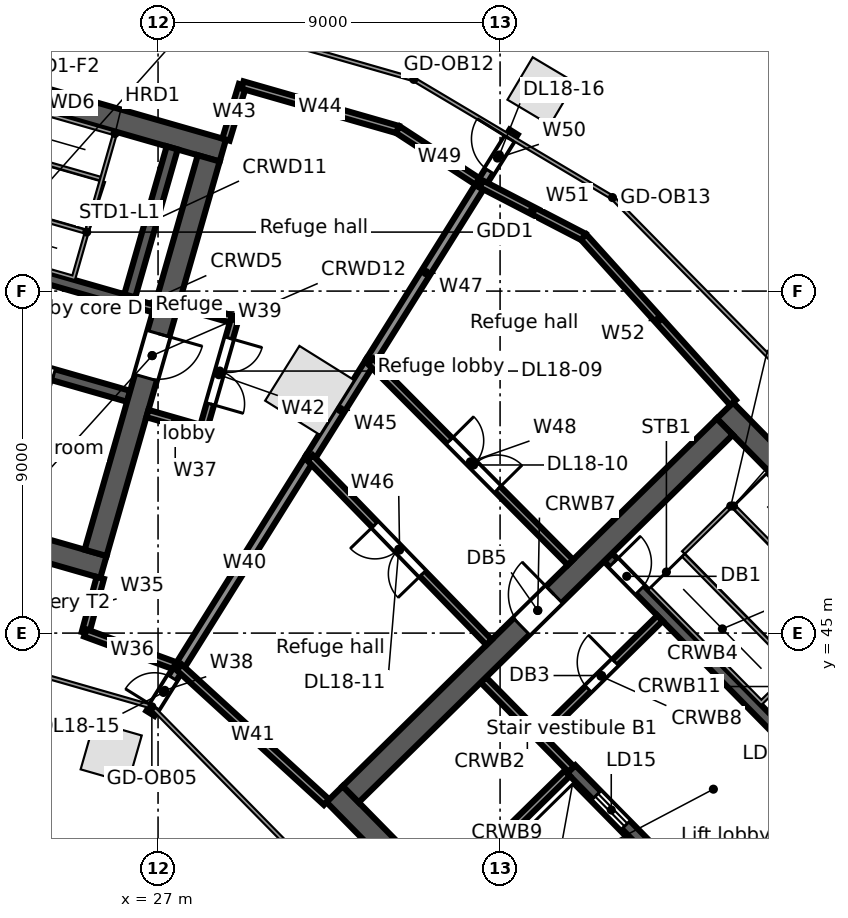
"""IFC4 building model, lengths in metres.
Left out: names, types, materials, properties, quantities, classifications, styles, units other than length and angle.
Written with IfcOpenShell. Run it as: python <this file> out.ifc"""

import sys

from ifc_helpers import new_model, si_unit, direction, frame, frame_2d, origin, origin_2d, place, context, subcontext, project, spatial, rectangle, extrude, element, fill, save


model = new_model("IFC4")
c1 = context("Model", 3, precision=1e-05, world=origin(), true_north=direction((0.0, 1.0)))
c2 = subcontext(c1, "Body", "Model", "MODEL_VIEW")
j1 = project(units=[si_unit("LENGTHUNIT", "METRE"), si_unit("PLANEANGLEUNIT", "RADIAN")], contexts=[c1])
p1 = place(None, origin())
s1 = spatial("IfcSite", under=j1, at=p1, CompositionType="ELEMENT")
p2 = place(p1, origin())
s2 = spatial("IfcBuilding", under=s1, at=p2, CompositionType="ELEMENT")
p3 = place(p2, frame((0.0, 0.0, 91.5)))
s3 = spatial("IfcBuildingStorey", under=s2, at=p3, CompositionType="ELEMENT", Elevation=91.5)
for number, where, z_axis, x_axis in (
    (1, (37.085, 59.262, 0.0), (0.0, 0.0, 1.0), (-0.859, 0.511, 0.0)),
    (2, (25.767, 41.86, 0.0), (0.0, 0.0, 1.0), (0.961, -0.276, 0.0)),
):
    element("IfcColumn", number, at=place(p3, frame(where, z_axis=z_axis, x_axis=x_axis)), inside=s3, PredefinedType="COLUMN", context=c2, shape_type="SweptSolid", body=[
        extrude(rectangle(XDim=1.3, YDim=1.3, at=origin_2d()), origin(), (0.0, 0.0, 1.0), 5.6),
    ])
p4 = place(p3, frame((30.99, 51.386, 0.0), z_axis=(0.0, 0.0, 1.0), x_axis=(0.529919264233, 0.848048096156, 0.0)))
e3 = element("IfcColumn", 3, at=p4, inside=s3, PredefinedType="COLUMN", context=c2, shape_type="SweptSolid", body=[
    extrude(rectangle(XDim=1.7, YDim=1.7, at=origin_2d()), origin(), (0.0, 0.0, 1.0), 5.6),
])
p5 = place(p3, frame((31.646, 40.763, 0.0), z_axis=(0.0, 0.0, 1.0), x_axis=(0.700911255944, -0.713248491965, 0.0)))
e4 = element("IfcWall", 4, at=p5, inside=s3, PredefinedType="SOLIDWALL", context=c2, shape_type="SweptSolid", body=[
    extrude(rectangle(XDim=15.0, YDim=0.6, at=frame_2d((7.5, 0.0))), origin(), (0.0, 0.0, 1.0), 5.28),
])
p6 = place(p5, frame((12.9, 0.0, 0.0)))
e5 = element("IfcOpeningElement", 5, at=p6, cuts=e4, PredefinedType="OPENING", context=c2, shape_type="SweptSolid", body=[
    extrude(rectangle(XDim=1.2, YDim=2.1, at=frame_2d((0.6, 1.05))), frame((0.0, 0.31, 0.0), z_axis=(0.0, -1.0, 0.0), x_axis=(1.0, 0.0, 0.0)), (0.0, 0.0, 1.0), 0.62),
])
p7 = place(p3, frame((35.561, 43.769, 0.0), z_axis=(0.0, 0.0, 1.0), x_axis=(0.70090232736, -0.713257266, 0.0)))
e6 = element("IfcWall", 6, at=p7, inside=s3, PredefinedType="SOLIDWALL", context=c2, shape_type="SweptSolid", body=[
    extrude(rectangle(XDim=3.3, YDim=0.2, at=frame_2d((1.65, 0.0))), origin(), (0.0, 0.0, 1.0), 5.28),
])
p8 = place(p3, frame((37.874, 41.416, 0.0), z_axis=(0.0, 0.0, 1.0), x_axis=(0.700918271237, -0.71324159795, 0.0)))
e7 = element("IfcWall", 7, at=p8, inside=s3, PredefinedType="SOLIDWALL", context=c2, shape_type="SweptSolid", body=[
    extrude(rectangle(XDim=8.4, YDim=0.3, at=frame_2d((4.2, 0.0))), origin(), (0.0, 0.0, 1.0), 5.28),
])
p9 = place(p8, frame((0.95, 0.0, 0.0)))
e8 = element("IfcOpeningElement", 8, at=p9, cuts=e7, PredefinedType="OPENING", context=c2, shape_type="SweptSolid", body=[
    extrude(rectangle(XDim=1.1, YDim=2.1, at=frame_2d((0.55, 1.05))), frame((0.0, 0.16, 0.0), z_axis=(0.0, -1.0, 0.0), x_axis=(1.0, 0.0, 0.0)), (0.0, 0.0, 1.0), 0.32),
])
p10 = place(p8, frame((3.95, 0.0, 0.0)))
e9 = element("IfcOpeningElement", 9, at=p10, cuts=e7, PredefinedType="OPENING", context=c2, shape_type="SweptSolid", body=[
    extrude(rectangle(XDim=1.1, YDim=2.1, at=frame_2d((0.55, 1.05))), frame((0.0, 0.16, 0.0), z_axis=(0.0, -1.0, 0.0), x_axis=(1.0, 0.0, 0.0)), (0.0, 0.0, 1.0), 0.32),
])
p11 = place(p8, frame((6.65, 0.0, 0.0)))
e10 = element("IfcOpeningElement", 10, at=p11, cuts=e7, PredefinedType="OPENING", context=c2, shape_type="SweptSolid", body=[
    extrude(rectangle(XDim=1.1, YDim=2.1, at=frame_2d((0.55, 1.05))), frame((0.0, 0.16, 0.0), z_axis=(0.0, -1.0, 0.0), x_axis=(1.0, 0.0, 0.0)), (0.0, 0.0, 1.0), 0.32),
])
p12 = place(p3, frame((38.842, 46.993, 0.0), z_axis=(0.0, 0.0, 1.0), x_axis=(0.700907701701, -0.713251984713, 0.0)))
e11 = element("IfcWall", 11, at=p12, inside=s3, PredefinedType="SOLIDWALL", context=c2, shape_type="SweptSolid", body=[
    extrude(rectangle(XDim=7.1, YDim=0.3, at=frame_2d((3.55, 0.0))), origin(), (0.0, 0.0, 1.0), 5.28),
])
p13 = place(p12, frame((0.2, 0.0, 0.0)))
e12 = element("IfcOpeningElement", 12, at=p13, cuts=e11, PredefinedType="OPENING", context=c2, shape_type="SweptSolid", body=[
    extrude(rectangle(XDim=1.0, YDim=2.1, at=frame_2d((0.5, 1.05))), frame((0.0, 0.16, 0.0), z_axis=(0.0, -1.0, 0.0), x_axis=(1.0, 0.0, 0.0)), (0.0, 0.0, 1.0), 0.32),
])
p14 = place(p3, frame((41.917, 50.856, 0.0), z_axis=(0.0, 0.0, 1.0), x_axis=(0.700911255944, -0.713248491965, 0.0)))
e13 = element("IfcWall", 13, at=p14, inside=s3, PredefinedType="SOLIDWALL", context=c2, shape_type="SweptSolid", body=[
    extrude(rectangle(XDim=15.0, YDim=0.6, at=frame_2d((7.5, 0.0))), origin(), (0.0, 0.0, 1.0), 5.28),
])
p15 = place(p3, frame((32.07, 40.759, 0.0), z_axis=(0.0, 0.0, 1.0), x_axis=(0.713245344712, 0.70091445858, 0.0)))
e14 = element("IfcWall", 14, at=p15, inside=s3, PredefinedType="SOLIDWALL", context=c2, shape_type="SweptSolid", body=[
    extrude(rectangle(XDim=13.8, YDim=0.6, at=frame_2d((6.9, 0.0))), origin(), (0.0, 0.0, 1.0), 5.28),
])
p16 = place(p15, frame((6.3, 0.0, 0.0)))
e15 = element("IfcOpeningElement", 15, at=p16, cuts=e14, PredefinedType="OPENING", context=c2, shape_type="SweptSolid", body=[
    extrude(rectangle(XDim=1.2, YDim=2.1, at=frame_2d((0.6, 1.05))), frame((0.0, 0.31, 0.0), z_axis=(0.0, -1.0, 0.0), x_axis=(1.0, 0.0, 0.0)), (0.0, 0.0, 1.0), 0.62),
])
p17 = place(p3, frame((37.104, 42.342, 0.0), z_axis=(0.0, 0.0, 1.0), x_axis=(0.713281298468, 0.700877870428, 0.0)))
e16 = element("IfcWall", 16, at=p17, inside=s3, PredefinedType="PARTITIONING", context=c2, shape_type="SweptSolid", body=[
    extrude(rectangle(XDim=4.35, YDim=0.2, at=frame_2d((2.175, 0.0))), origin(), (0.0, 0.0, 1.0), 5.28),
])
p18 = place(p17, frame((1.7, 0.0, 0.0)))
e17 = element("IfcOpeningElement", 17, at=p18, cuts=e16, PredefinedType="OPENING", context=c2, shape_type="SweptSolid", body=[
    extrude(rectangle(XDim=1.0, YDim=2.1, at=frame_2d((0.5, 1.05))), frame((0.0, 0.11, 0.0), z_axis=(0.0, -1.0, 0.0), x_axis=(1.0, 0.0, 0.0)), (0.0, 0.0, 1.0), 0.22),
])
p19 = place(p3, frame((34.593, 38.191, 0.0), z_axis=(0.0, 0.0, 1.0), x_axis=(0.713252216116, 0.700907466222, 0.0)))
e18 = element("IfcWall", 18, at=p19, inside=s3, PredefinedType="SOLIDWALL", context=c2, shape_type="SweptSolid", body=[
    extrude(rectangle(XDim=4.45, YDim=0.2, at=frame_2d((2.225, 0.0))), origin(), (0.0, 0.0, 1.0), 5.28),
])
p20 = place(p3, frame((42.163, 30.488, 0.0), z_axis=(0.0, 0.0, 1.0), x_axis=(0.713245344712, 0.70091445858, 0.0)))
e19 = element("IfcWall", 19, at=p20, inside=s3, PredefinedType="SOLIDWALL", context=c2, shape_type="SweptSolid", body=[
    extrude(rectangle(XDim=13.8, YDim=0.6, at=frame_2d((6.9, 0.0))), origin(), (0.0, 0.0, 1.0), 5.28),
])
p21 = place(p3, frame((16.911, 49.221, 0.0), z_axis=(0.0, 0.0, 1.0), x_axis=(0.96126248289, -0.275634611374, 0.0)))
e20 = element("IfcWall", 20, at=p21, inside=s3, PredefinedType="SOLIDWALL", context=c2, shape_type="SweptSolid", body=[
    extrude(rectangle(XDim=9.0, YDim=0.6, at=frame_2d((4.5, 0.0))), origin(), (0.0, 0.0, 1.0), 5.28),
])
p22 = place(p3, frame((21.131, 52.692, 0.0), z_axis=(0.0, 0.0, 1.0), x_axis=(0.961271492568, -0.275603188616, 0.0)))
e21 = element("IfcWall", 21, at=p22, inside=s3, PredefinedType="SOLIDWALL", context=c2, shape_type="SweptSolid", body=[
    extrude(rectangle(XDim=5.3, YDim=0.3, at=frame_2d((2.65, 0.0))), origin(), (0.0, 0.0, 1.0), 5.28),
])
p23 = place(p22, frame((2.35, 0.0, 0.0)))
e22 = element("IfcOpeningElement", 22, at=p23, cuts=e21, PredefinedType="OPENING", context=c2, shape_type="SweptSolid", body=[
    extrude(rectangle(XDim=0.9, YDim=2.1, at=frame_2d((0.45, 1.05))), frame((0.0, 0.16, 0.0), z_axis=(0.0, -1.0, 0.0), x_axis=(1.0, 0.0, 0.0)), (0.0, 0.0, 1.0), 0.32),
])
p24 = place(p3, frame((19.389, 55.689, 0.0), z_axis=(0.0, 0.0, 1.0), x_axis=(0.961261397636, -0.275638396117, 0.0)))
e23 = element("IfcWall", 23, at=p24, inside=s3, PredefinedType="SOLIDWALL", context=c2, shape_type="SweptSolid", body=[
    extrude(rectangle(XDim=7.1, YDim=0.3, at=frame_2d((3.55, 0.0))), origin(), (0.0, 0.0, 1.0), 5.28),
])
p25 = place(p24, frame((0.2, 0.0, 0.0)))
e24 = element("IfcOpeningElement", 24, at=p25, cuts=e23, PredefinedType="OPENING", context=c2, shape_type="SweptSolid", body=[
    extrude(rectangle(XDim=1.0, YDim=2.1, at=frame_2d((0.5, 1.05))), frame((0.0, 0.16, 0.0), z_axis=(0.0, -1.0, 0.0), x_axis=(1.0, 0.0, 0.0)), (0.0, 0.0, 1.0), 0.32),
])
p26 = place(p3, frame((26.214, 53.732, 0.0), z_axis=(0.0, 0.0, 1.0), x_axis=(0.96122076476, -0.27578005982, 0.0)))
e25 = element("IfcWall", 25, at=p26, inside=s3, PredefinedType="SOLIDWALL", context=c2, shape_type="SweptSolid", body=[
    extrude(rectangle(XDim=0.7, YDim=0.2, at=frame_2d((0.35, 0.0))), origin(), (0.0, 0.0, 1.0), 5.28),
])
p27 = place(p3, frame((20.053, 60.18, 0.0), z_axis=(0.0, 0.0, 1.0), x_axis=(0.96126248289, -0.275634611374, 0.0)))
e26 = element("IfcWall", 26, at=p27, inside=s3, PredefinedType="SOLIDWALL", context=c2, shape_type="SweptSolid", body=[
    extrude(rectangle(XDim=9.0, YDim=0.6, at=frame_2d((4.5, 0.0))), origin(), (0.0, 0.0, 1.0), 5.28),
])
p28 = place(p3, frame((26.256, 53.876, 0.0), z_axis=(0.0, 0.0, 1.0), x_axis=(0.275612739511, 0.961268754209, 0.0)))
e27 = element("IfcWall", 27, at=p28, inside=s3, PredefinedType="SOLIDWALL", context=c2, shape_type="SweptSolid", body=[
    extrude(rectangle(XDim=4.05, YDim=0.3, at=frame_2d((2.025, 0.0))), origin(), (0.0, 0.0, 1.0), 5.28),
])
p29 = place(p3, frame((25.356, 47.112, 0.0), z_axis=(0.0, 0.0, 1.0), x_axis=(0.275631631629, 0.961263337304, 0.0)))
e28 = element("IfcWall", 28, at=p29, inside=s3, PredefinedType="SOLIDWALL", context=c2, shape_type="SweptSolid", body=[
    extrude(rectangle(XDim=10.8, YDim=0.6, at=frame_2d((5.4, 0.0))), origin(), (0.0, 0.0, 1.0), 5.28),
])
p30 = place(p29, frame((4.8, 0.0, 0.0)))
e29 = element("IfcOpeningElement", 29, at=p30, cuts=e28, PredefinedType="OPENING", context=c2, shape_type="SweptSolid", body=[
    extrude(rectangle(XDim=1.2, YDim=2.1, at=frame_2d((0.6, 1.05))), frame((0.0, 0.31, 0.0), z_axis=(0.0, -1.0, 0.0), x_axis=(1.0, 0.0, 0.0)), (0.0, 0.0, 1.0), 0.62),
])
p31 = place(p3, frame((25.088, 45.004, 0.0), z_axis=(0.0, 0.0, 1.0), x_axis=(0.260761429939, 0.965403271517, 0.0)))
e30 = element("IfcWall", 30, at=p31, inside=s3, PredefinedType="PARTITIONING", context=c2, shape_type="SweptSolid", body=[
    extrude(rectangle(XDim=1.5, YDim=0.2, at=frame_2d((0.75, 0.0))), origin(), (0.0, 0.0, 1.0), 5.28),
])
p32 = place(p3, frame((25.088, 45.004, 0.0), z_axis=(0.0, 0.0, 1.0), x_axis=(0.93889532653, -0.344202797519, 0.0)))
e31 = element("IfcWall", 31, at=p32, inside=s3, PredefinedType="PARTITIONING", context=c2, shape_type="SweptSolid", body=[
    extrude(rectangle(XDim=2.629, YDim=0.2, at=frame_2d((1.314, 0.0))), origin(), (0.0, 0.0, 1.0), 4.452),
])
p33 = place(p3, frame((26.72, 50.778, 0.0), z_axis=(0.0, 0.0, 1.0), x_axis=(0.961202731862, -0.275842905041, 0.0)))
e32 = element("IfcWall", 32, at=p33, inside=s3, PredefinedType="PARTITIONING", context=c2, shape_type="SweptSolid", body=[
    extrude(rectangle(XDim=1.523, YDim=0.2, at=frame_2d((0.762, 0.0))), origin(), (0.0, 0.0, 1.0), 5.28),
])
p34 = place(p3, frame((26.799, 42.887, 0.0), z_axis=(0.0, 0.0, 1.0), x_axis=(0.529614967624, 0.848238165888, 0.0)))
e33 = element("IfcWall", 33, at=p34, inside=s3, PredefinedType="PARTITIONING", context=c2, shape_type="SweptSolid", body=[
    extrude(rectangle(XDim=1.429, YDim=0.25, at=frame_2d((0.714, 0.0))), origin(), (0.0, 0.0, 1.0), 5.28),
])
p35 = place(p34, frame((0.2, 0.0, 0.0)))
e34 = element("IfcOpeningElement", 34, at=p35, cuts=e33, PredefinedType="OPENING", context=c2, shape_type="SweptSolid", body=[
    extrude(rectangle(XDim=0.9, YDim=2.1, at=frame_2d((0.45, 1.05))), frame((0.0, 0.135, 0.0), z_axis=(0.0, -1.0, 0.0), x_axis=(1.0, 0.0, 0.0)), (0.0, 0.0, 1.0), 0.27),
])
p36 = place(p3, frame((27.547, 53.662, 0.0), z_axis=(0.0, 0.0, 1.0), x_axis=(0.961190533403, -0.27588540827, 0.0)))
e35 = element("IfcWall", 35, at=p36, inside=s3, PredefinedType="PARTITIONING", context=c2, shape_type="SweptSolid", body=[
    extrude(rectangle(XDim=1.523, YDim=0.2, at=frame_2d((0.761, 0.0))), origin(), (0.0, 0.0, 1.0), 5.28),
])
p37 = place(p3, frame((27.556, 44.099, 0.0), z_axis=(0.0, 0.0, 1.0), x_axis=(0.529901019477, 0.848059496472, 0.0)))
e36 = element("IfcWall", 36, at=p37, inside=s3, PredefinedType="PARTITIONING", context=c2, shape_type="SweptSolid", body=[
    extrude(rectangle(XDim=6.5, YDim=0.25, at=frame_2d((3.25, 0.0))), origin(), (0.0, 0.0, 1.0), 5.28),
])
p38 = place(p3, frame((27.556, 44.099, 0.0), z_axis=(0.0, 0.0, 1.0), x_axis=(0.737709390417, -0.675118400942, 0.0)))
e37 = element("IfcWall", 37, at=p38, inside=s3, PredefinedType="PARTITIONING", context=c2, shape_type="SweptSolid", body=[
    extrude(rectangle(XDim=5.254, YDim=0.2, at=frame_2d((2.627, 0.0))), origin(), (0.0, 0.0, 1.0), 5.28),
])
p39 = place(p3, frame((28.184, 50.358, 0.0), z_axis=(0.0, 0.0, 1.0), x_axis=(0.27561305073, 0.961268664977, 0.0)))
e38 = element("IfcWall", 38, at=p39, inside=s3, PredefinedType="PARTITIONING", context=c2, shape_type="SweptSolid", body=[
    extrude(rectangle(XDim=3.0, YDim=0.2, at=frame_2d((1.5, 0.0))), origin(), (0.0, 0.0, 1.0), 4.86),
])
p40 = place(p39, frame((0.7, 0.0, 0.0)))
e39 = element("IfcOpeningElement", 39, at=p40, cuts=e38, PredefinedType="OPENING", context=c2, shape_type="SweptSolid", body=[
    extrude(rectangle(XDim=1.8, YDim=2.1, at=frame_2d((0.9, 1.05))), frame((0.0, 0.11, 0.0), z_axis=(0.0, -1.0, 0.0), x_axis=(1.0, 0.0, 0.0)), (0.0, 0.0, 1.0), 0.22),
])
p41 = place(p3, frame((28.787, 57.987, 0.0), z_axis=(0.0, 0.0, 1.0), x_axis=(0.290391164202, 0.9569080268, 0.0)))
e40 = element("IfcWall", 40, at=p41, inside=s3, PredefinedType="PARTITIONING", context=c2, shape_type="SweptSolid", body=[
    extrude(rectangle(XDim=1.501, YDim=0.2, at=frame_2d((0.75, 0.0))), origin(), (0.0, 0.0, 1.0), 5.28),
])
p42 = place(p3, frame((29.223, 59.423, 0.0), z_axis=(0.0, 0.0, 1.0), x_axis=(0.961217704803, -0.27579072496, 0.0)))
e41 = element("IfcWall", 41, at=p42, inside=s3, PredefinedType="PARTITIONING", context=c2, shape_type="SweptSolid", body=[
    extrude(rectangle(XDim=4.25, YDim=0.2, at=frame_2d((2.125, 0.0))), origin(), (0.0, 0.0, 1.0), 5.28),
])
p43 = place(p3, frame((31.0, 49.611, 0.0), z_axis=(0.0, 0.0, 1.0), x_axis=(0.530028199927, 0.847980015851, 0.0)))
e42 = element("IfcWall", 42, at=p43, inside=s3, PredefinedType="PARTITIONING", context=c2, shape_type="SweptSolid", body=[
    extrude(rectangle(XDim=3.0, YDim=0.25, at=frame_2d((1.5, 0.0))), origin(), (0.0, 0.0, 1.0), 4.342),
])
p44 = place(p3, frame((31.0, 49.611, 0.0), z_axis=(0.0, 0.0, 1.0), x_axis=(0.696524576566, -0.717532935996, 0.0)))
e43 = element("IfcWall", 43, at=p44, inside=s3, PredefinedType="PARTITIONING", context=c2, shape_type="SweptSolid", body=[
    extrude(rectangle(XDim=6.763, YDim=0.2, at=frame_2d((3.382, 0.0))), origin(), (0.0, 0.0, 1.0), 5.28),
])
p45 = place(p44, frame((2.45, 0.0, 0.0)))
e44 = element("IfcOpeningElement", 44, at=p45, cuts=e43, PredefinedType="OPENING", context=c2, shape_type="SweptSolid", body=[
    extrude(rectangle(XDim=1.8, YDim=2.1, at=frame_2d((0.9, 1.05))), frame((0.0, 0.11, 0.0), z_axis=(0.0, -1.0, 0.0), x_axis=(1.0, 0.0, 0.0)), (0.0, 0.0, 1.0), 0.22),
])
p46 = place(p3, frame((32.59, 52.155, 0.0), z_axis=(0.0, 0.0, 1.0), x_axis=(0.529967019041, 0.848018253771, 0.0)))
e45 = element("IfcWall", 45, at=p46, inside=s3, PredefinedType="PARTITIONING", context=c2, shape_type="SweptSolid", body=[
    extrude(rectangle(XDim=5.5, YDim=0.25, at=frame_2d((2.75, 0.0))), origin(), (0.0, 0.0, 1.0), 4.342),
])
p47 = place(p3, frame((32.59, 52.155, 0.0), z_axis=(0.0, 0.0, 1.0), x_axis=(0.704895322568, -0.709311345054, 0.0)))
e46 = element("IfcWall", 46, at=p47, inside=s3, PredefinedType="PARTITIONING", context=c2, shape_type="SweptSolid", body=[
    extrude(rectangle(XDim=7.463, YDim=0.2, at=frame_2d((3.732, 0.0))), origin(), (0.0, 0.0, 1.0), 4.342),
])
p48 = place(p47, frame((2.95, 0.0, 0.0)))
e47 = element("IfcOpeningElement", 47, at=p48, cuts=e46, PredefinedType="OPENING", context=c2, shape_type="SweptSolid", body=[
    extrude(rectangle(XDim=1.8, YDim=2.1, at=frame_2d((0.9, 1.05))), frame((0.0, 0.11, 0.0), z_axis=(0.0, -1.0, 0.0), x_axis=(1.0, 0.0, 0.0)), (0.0, 0.0, 1.0), 0.22),
])
p49 = place(p3, frame((33.308, 58.251, 0.0), z_axis=(0.0, 0.0, 1.0), x_axis=(0.837749484824, -0.546054759779, 0.0)))
e48 = element("IfcWall", 48, at=p49, inside=s3, PredefinedType="PARTITIONING", context=c2, shape_type="SweptSolid", body=[
    extrude(rectangle(XDim=2.622, YDim=0.2, at=frame_2d((1.311, 0.0))), origin(), (0.0, 0.0, 1.0), 5.28),
])
p50 = place(p3, frame((35.505, 56.819, 0.0), z_axis=(0.0, 0.0, 1.0), x_axis=(0.529794245677, 0.848126203609, 0.0)))
e49 = element("IfcWall", 49, at=p50, inside=s3, PredefinedType="PARTITIONING", context=c2, shape_type="SweptSolid", body=[
    extrude(rectangle(XDim=1.608, YDim=0.25, at=frame_2d((0.804, 0.0))), origin(), (0.0, 0.0, 1.0), 4.342),
])
p51 = place(p50, frame((0.4, 0.0, 0.0)))
e50 = element("IfcOpeningElement", 50, at=p51, cuts=e49, PredefinedType="OPENING", context=c2, shape_type="SweptSolid", body=[
    extrude(rectangle(XDim=1.0, YDim=2.1, at=frame_2d((0.5, 1.05))), frame((0.0, 0.135, 0.0), z_axis=(0.0, -1.0, 0.0), x_axis=(1.0, 0.0, 0.0)), (0.0, 0.0, 1.0), 0.27),
])
p52 = place(p3, frame((35.505, 56.819, 0.0), z_axis=(0.0, 0.0, 1.0), x_axis=(0.887881146957, -0.460072895179, 0.0)))
e51 = element("IfcWall", 51, at=p52, inside=s3, PredefinedType="PARTITIONING", context=c2, shape_type="SweptSolid", body=[
    extrude(rectangle(XDim=3.034, YDim=0.2, at=frame_2d((1.517, 0.0))), origin(), (0.0, 0.0, 1.0), 4.342),
])
p53 = place(p3, frame((38.199, 55.423, 0.0), z_axis=(0.0, 0.0, 1.0), x_axis=(0.669853780439, -0.742493038911, 0.0)))
e52 = element("IfcWall", 52, at=p53, inside=s3, PredefinedType="PARTITIONING", context=c2, shape_type="SweptSolid", body=[
    extrude(rectangle(XDim=5.868, YDim=0.2, at=frame_2d((2.934, 0.0))), origin(), (0.0, 0.0, 1.0), 5.28),
])
p54 = place(p9, origin())
e53 = element("IfcDoor", 53, at=p54, inside=s3, OperationType="DOUBLE_DOOR_SLIDING", PredefinedType="DOOR", context=c2, shape_type="SweptSolid", body=[
    extrude(rectangle(XDim=1.1, YDim=2.1, at=frame_2d((0.55, 1.05))), frame((0.0, 0.025, 0.0), z_axis=(0.0, -1.0, 0.0), x_axis=(1.0, 0.0, 0.0)), (0.0, 0.0, 1.0), 0.05),
])
fill(e8, e53)
p55 = place(p13, origin())
e54 = element("IfcDoor", 54, at=p55, inside=s3, OperationType="SINGLE_SWING_LEFT", PredefinedType="DOOR", context=c2, shape_type="SweptSolid", body=[
    extrude(rectangle(XDim=1.0, YDim=2.1, at=frame_2d((0.5, 1.05))), frame((0.0, 0.025, 0.0), z_axis=(0.0, -1.0, 0.0), x_axis=(1.0, 0.0, 0.0)), (0.0, 0.0, 1.0), 0.05),
])
fill(e12, e54)
p56 = place(p18, origin())
e55 = element("IfcDoor", 55, at=p56, inside=s3, OperationType="SINGLE_SWING_RIGHT", PredefinedType="DOOR", context=c2, shape_type="SweptSolid", body=[
    extrude(rectangle(XDim=1.0, YDim=2.1, at=frame_2d((0.5, 1.05))), frame((0.0, 0.025, 0.0), z_axis=(0.0, -1.0, 0.0), x_axis=(1.0, 0.0, 0.0)), (0.0, 0.0, 1.0), 0.05),
])
fill(e17, e55)
p57 = place(p16, origin())
e56 = element("IfcDoor", 56, at=p57, inside=s3, OperationType="SINGLE_SWING_RIGHT", PredefinedType="DOOR", context=c2, shape_type="SweptSolid", body=[
    extrude(rectangle(XDim=1.2, YDim=2.1, at=frame_2d((0.6, 1.05))), frame((0.0, 0.025, 0.0), z_axis=(0.0, -1.0, 0.0), x_axis=(1.0, 0.0, 0.0)), (0.0, 0.0, 1.0), 0.05),
])
fill(e15, e56)
p58 = place(p30, frame((1.2, 0.0, 0.0), z_axis=(0.0, 0.0, 1.0), x_axis=(-1.0, 0.0, 0.0)))
e57 = element("IfcDoor", 57, at=p58, inside=s3, OperationType="SINGLE_SWING_LEFT", PredefinedType="DOOR", context=c2, shape_type="SweptSolid", body=[
    extrude(rectangle(XDim=1.2, YDim=2.1, at=frame_2d((0.6, 1.05))), frame((0.0, 0.025, 0.0), z_axis=(0.0, -1.0, 0.0), x_axis=(1.0, 0.0, 0.0)), (0.0, 0.0, 1.0), 0.05),
])
fill(e29, e57)
p59 = place(p23, frame((0.9, 0.0, 0.0), z_axis=(0.0, 0.0, 1.0), x_axis=(-1.0, 0.0, 0.0)))
e58 = element("IfcDoor", 58, at=p59, inside=s3, OperationType="SINGLE_SWING_LEFT", PredefinedType="DOOR", context=c2, shape_type="SweptSolid", body=[
    extrude(rectangle(XDim=0.9, YDim=2.1, at=frame_2d((0.45, 1.05))), frame((0.0, 0.025, 0.0), z_axis=(0.0, -1.0, 0.0), x_axis=(1.0, 0.0, 0.0)), (0.0, 0.0, 1.0), 0.05),
])
fill(e22, e58)
p60 = place(p40, frame((1.8, 0.0, 0.0), z_axis=(0.0, 0.0, 1.0), x_axis=(-1.0, 0.0, 0.0)))
e59 = element("IfcDoor", 59, at=p60, inside=s3, OperationType="DOUBLE_DOOR_SINGLE_SWING", PredefinedType="DOOR", context=c2, shape_type="SweptSolid", body=[
    extrude(rectangle(XDim=1.8, YDim=2.1, at=frame_2d((0.9, 1.05))), frame((0.0, 0.025, 0.0), z_axis=(0.0, -1.0, 0.0), x_axis=(1.0, 0.0, 0.0)), (0.0, 0.0, 1.0), 0.05),
])
fill(e39, e59)
p61 = place(p48, origin())
e60 = element("IfcDoor", 60, at=p61, inside=s3, OperationType="DOUBLE_DOOR_SINGLE_SWING", PredefinedType="DOOR", context=c2, shape_type="SweptSolid", body=[
    extrude(rectangle(XDim=1.8, YDim=2.1, at=frame_2d((0.9, 1.05))), frame((0.0, 0.025, 0.0), z_axis=(0.0, -1.0, 0.0), x_axis=(1.0, 0.0, 0.0)), (0.0, 0.0, 1.0), 0.05),
])
fill(e47, e60)
p62 = place(p45, frame((1.8, 0.0, 0.0), z_axis=(0.0, 0.0, 1.0), x_axis=(-1.0, 0.0, 0.0)))
e61 = element("IfcDoor", 61, at=p62, inside=s3, OperationType="DOUBLE_DOOR_SINGLE_SWING", PredefinedType="DOOR", context=c2, shape_type="SweptSolid", body=[
    extrude(rectangle(XDim=1.8, YDim=2.1, at=frame_2d((0.9, 1.05))), frame((0.0, 0.025, 0.0), z_axis=(0.0, -1.0, 0.0), x_axis=(1.0, 0.0, 0.0)), (0.0, 0.0, 1.0), 0.05),
])
fill(e44, e61)
p63 = place(p35, origin())
e62 = element("IfcDoor", 62, at=p63, inside=s3, OperationType="SINGLE_SWING_LEFT", PredefinedType="DOOR", context=c2, shape_type="SweptSolid", body=[
    extrude(rectangle(XDim=0.9, YDim=2.1, at=frame_2d((0.45, 1.05))), frame((0.0, 0.025, 0.0), z_axis=(0.0, -1.0, 0.0), x_axis=(1.0, 0.0, 0.0)), (0.0, 0.0, 1.0), 0.05),
])
fill(e34, e62)
p64 = place(p51, origin())
e63 = element("IfcDoor", 63, at=p64, inside=s3, OperationType="SINGLE_SWING_RIGHT", PredefinedType="DOOR", context=c2, shape_type="SweptSolid", body=[
    extrude(rectangle(XDim=1.0, YDim=2.1, at=frame_2d((0.5, 1.05))), frame((0.0, 0.025, 0.0), z_axis=(0.0, -1.0, 0.0), x_axis=(1.0, 0.0, 0.0)), (0.0, 0.0, 1.0), 0.05),
])
fill(e50, e63)
save(model, sys.argv[1])
